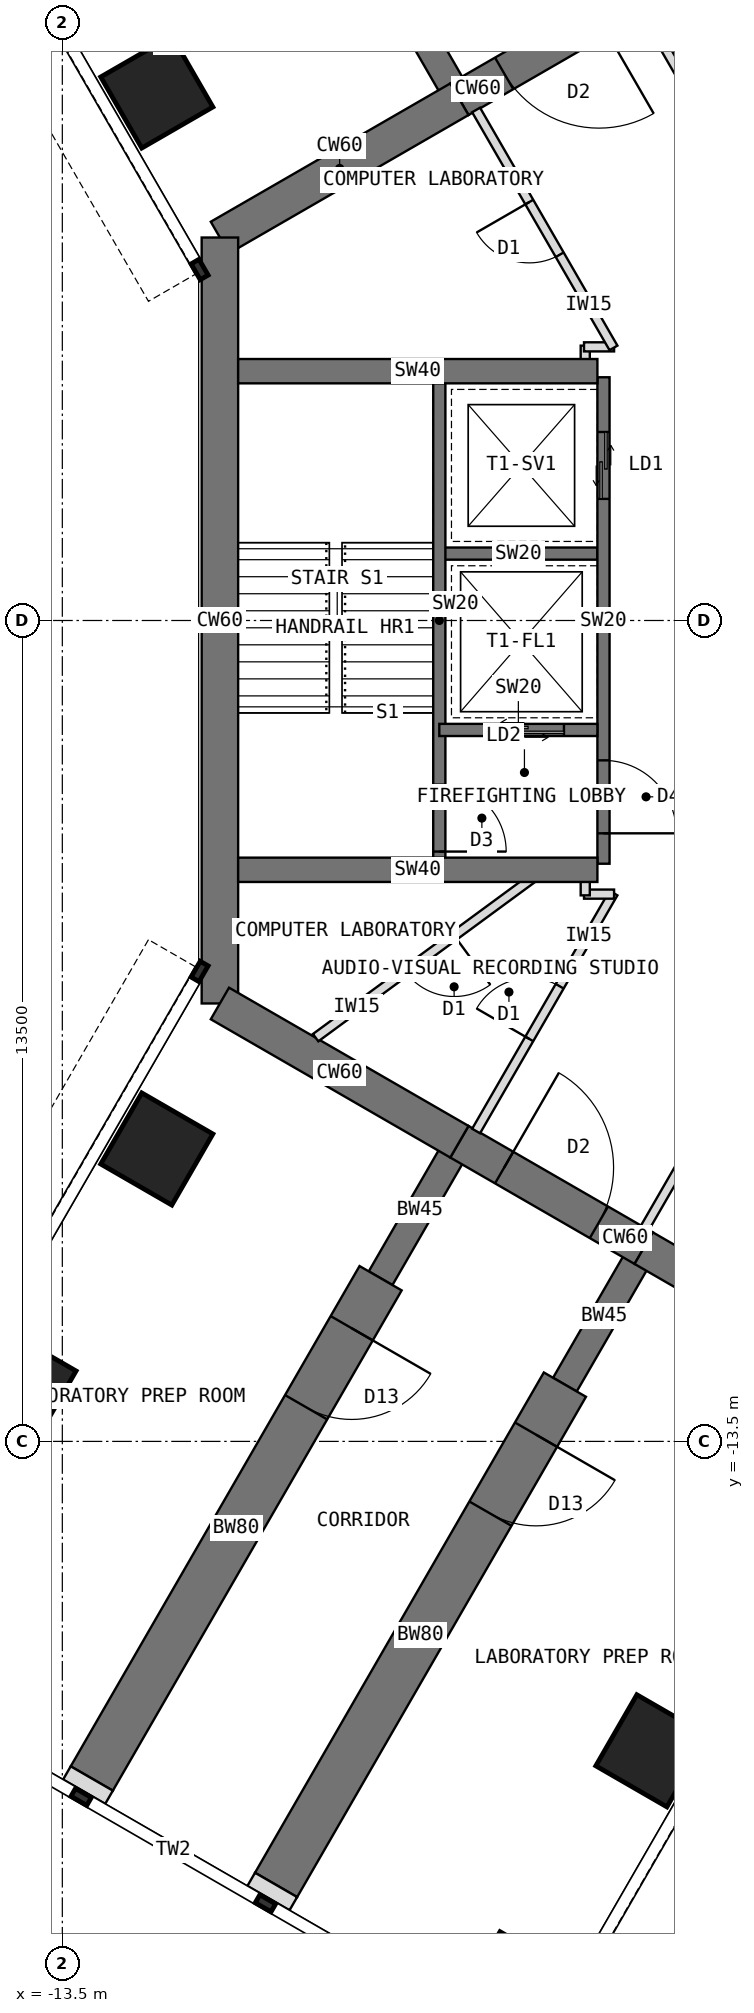
"""IFC4 building model, lengths in metres.
Left out: names, types, materials, properties, quantities, classifications, styles, units other than length and angle.
Written with IfcOpenShell. Run it as: python <this file> out.ifc"""

import sys

from ifc_helpers import new_model, si_unit, direction, frame, frame_2d, origin, origin_2d, place, context, subcontext, project, spatial, rectangle, extrude, element, fill, save


model = new_model("IFC4")
c1 = context("Model", 3, precision=1e-05, world=origin(), true_north=direction((0.0, 1.0)))
c2 = subcontext(c1, "Body", "Model", "MODEL_VIEW")
j1 = project(units=[si_unit("LENGTHUNIT", "METRE"), si_unit("PLANEANGLEUNIT", "RADIAN")], contexts=[c1])
p1 = place(None, origin())
s1 = spatial("IfcSite", under=j1, at=p1, CompositionType="ELEMENT")
p2 = place(p1, origin())
s2 = spatial("IfcBuilding", under=s1, at=p2, CompositionType="ELEMENT")
p3 = place(p2, frame((0.0, 0.0, 101.5)))
s3 = spatial("IfcBuildingStorey", under=s2, at=p3, CompositionType="ELEMENT", Elevation=101.5)
p4 = place(p3, frame((-3.939, 10.322, 0.0), z_axis=(0.0, 0.0, 1.0), x_axis=(-0.866019471182, -0.500010275428, 0.0)))
e1 = element("IfcWall", 1, at=p4, inside=s3, PredefinedType="SHEAR", context=c2, shape_type="SweptSolid", body=[
    extrude(rectangle(XDim=3.5, YDim=0.6, at=frame_2d((1.75, 0.0))), origin(), (0.0, 0.0, 1.0), 4.0),
])
p5 = place(p4, frame((0.85, 0.0, 0.0)))
e2 = element("IfcOpeningElement", 2, at=p5, cuts=e1, PredefinedType="OPENING", context=c2, shape_type="SweptSolid", body=[
    extrude(rectangle(XDim=1.8, YDim=2.1, at=frame_2d((0.9, 1.05))), frame((0.0, 0.31, 0.0), z_axis=(0.0, -1.0, 0.0), x_axis=(1.0, 0.0, 0.0)), (0.0, 0.0, 1.0), 0.62),
])
p6 = place(p3, frame((-6.97, 8.572, 0.0), z_axis=(0.0, 0.0, 1.0), x_axis=(-0.866034513004, -0.499984222037, 0.0)))
e3 = element("IfcWall", 3, at=p6, inside=s3, PredefinedType="SHEAR", context=c2, shape_type="SweptSolid", body=[
    extrude(rectangle(XDim=4.548, YDim=0.6, at=frame_2d((2.274, 0.0))), origin(), (0.0, 0.0, 1.0), 4.0),
])
p7 = place(p3, frame((-10.908, 6.298, 0.0), z_axis=(0.0, 0.0, 1.0), x_axis=(0.0, -1.0, 0.0)))
e4 = element("IfcWall", 4, at=p7, inside=s3, PredefinedType="SHEAR", context=c2, shape_type="SweptSolid", body=[
    extrude(rectangle(XDim=12.596, YDim=0.6, at=frame_2d((6.298, 0.0))), origin(), (0.0, 0.0, 1.0), 4.0),
])
p8 = place(p3, frame((-10.908, -6.298, 0.0), z_axis=(0.0, 0.0, 1.0), x_axis=(0.866034513004, -0.499984222037, 0.0)))
e5 = element("IfcWall", 5, at=p8, inside=s3, PredefinedType="SHEAR", context=c2, shape_type="SweptSolid", body=[
    extrude(rectangle(XDim=4.548, YDim=0.6, at=frame_2d((2.274, 0.0))), origin(), (0.0, 0.0, 1.0), 4.0),
])
p9 = place(p3, frame((-6.97, -8.572, 0.0), z_axis=(0.0, 0.0, 1.0), x_axis=(0.866019471182, -0.500010275428, 0.0)))
e6 = element("IfcWall", 6, at=p9, inside=s3, PredefinedType="SHEAR", context=c2, shape_type="SweptSolid", body=[
    extrude(rectangle(XDim=3.5, YDim=0.6, at=frame_2d((1.75, 0.0))), origin(), (0.0, 0.0, 1.0), 4.0),
])
p10 = place(p9, frame((0.85, 0.0, 0.0)))
e7 = element("IfcOpeningElement", 7, at=p10, cuts=e6, PredefinedType="OPENING", context=c2, shape_type="SweptSolid", body=[
    extrude(rectangle(XDim=1.8, YDim=2.1, at=frame_2d((0.9, 1.05))), frame((0.0, 0.31, 0.0), z_axis=(0.0, -1.0, 0.0), x_axis=(1.0, 0.0, 0.0)), (0.0, 0.0, 1.0), 0.62),
])
p11 = place(p3, frame((-3.939, -10.322, 0.0), z_axis=(0.0, 0.0, 1.0), x_axis=(0.866011268655, -0.500024481964, 0.0)))
e8 = element("IfcWall", 8, at=p11, inside=s3, PredefinedType="SHEAR", context=c2, shape_type="SweptSolid", body=[
    extrude(rectangle(XDim=4.548, YDim=0.6, at=frame_2d((2.274, 0.0))), origin(), (0.0, 0.0, 1.0), 4.0),
])
for number, where, z_axis, x_axis in (
    (9, (-6.97, 8.572, 0.0), (0.0, 0.0, 1.0), (-0.5, 0.866, 0.0)),
    (10, (-3.939, -10.322, 0.0), (0.0, 0.0, 1.0), (-0.5, -0.866, 0.0)),
):
    element("IfcWall", number, at=place(p3, frame(where, z_axis=z_axis, x_axis=x_axis)), inside=s3, PredefinedType="SHEAR", context=c2, shape_type="SweptSolid", body=[
        extrude(rectangle(XDim=2.592, YDim=0.45, at=frame_2d((1.296, 0.0))), origin(), (0.0, 0.0, 1.0), 4.0),
    ])
p12 = place(p3, frame((-5.234, -12.566, 0.0), z_axis=(0.0, 0.0, 1.0), x_axis=(-0.499997557548, -0.86602681393, 0.0)))
e11 = element("IfcWall", 11, at=p12, inside=s3, PredefinedType="SHEAR", context=c2, shape_type="SweptSolid", body=[
    extrude(rectangle(XDim=9.5, YDim=0.8, at=frame_2d((4.75, 0.0))), origin(), (0.0, 0.0, 1.0), 4.0),
])
p13 = place(p12, frame((0.95, 0.0, 0.0)))
e12 = element("IfcOpeningElement", 12, at=p13, cuts=e11, PredefinedType="OPENING", context=c2, shape_type="SweptSolid", body=[
    extrude(rectangle(XDim=1.5, YDim=2.1, at=frame_2d((0.75, 1.05))), frame((0.0, 0.41, 0.0), z_axis=(0.0, -1.0, 0.0), x_axis=(1.0, 0.0, 0.0)), (0.0, 0.0, 1.0), 0.82),
])
p14 = place(p3, frame((-6.97, -8.572, 0.0), z_axis=(0.0, 0.0, 1.0), x_axis=(-0.499988811324, -0.866031863473, 0.0)))
e13 = element("IfcWall", 13, at=p14, inside=s3, PredefinedType="SHEAR", context=c2, shape_type="SweptSolid", body=[
    extrude(rectangle(XDim=2.592, YDim=0.45, at=frame_2d((1.296, 0.0))), origin(), (0.0, 0.0, 1.0), 4.0),
])
p15 = place(p3, frame((-8.266, -10.816, 0.0), z_axis=(0.0, 0.0, 1.0), x_axis=(-0.499997557548, -0.86602681393, 0.0)))
e14 = element("IfcWall", 14, at=p15, inside=s3, PredefinedType="SHEAR", context=c2, shape_type="SweptSolid", body=[
    extrude(rectangle(XDim=9.5, YDim=0.8, at=frame_2d((4.75, 0.0))), origin(), (0.0, 0.0, 1.0), 4.0),
])
p16 = place(p15, frame((0.95, 0.0, 0.0)))
e15 = element("IfcOpeningElement", 15, at=p16, cuts=e14, PredefinedType="OPENING", context=c2, shape_type="SweptSolid", body=[
    extrude(rectangle(XDim=1.5, YDim=2.1, at=frame_2d((0.75, 1.05))), frame((0.0, 0.41, 0.0), z_axis=(0.0, -1.0, 0.0), x_axis=(1.0, 0.0, 0.0)), (0.0, 0.0, 1.0), 0.82),
])
for number, where, z_axis, x_axis in (
    (16, (-11.946, 8.691, 0.0), (0.0, 0.0, 1.0), (0.866, 0.5, 0.0)),
    (17, (-11.946, -8.691, 0.0), (0.0, 0.0, 1.0), (0.5, 0.866, 0.0)),
    (18, (-3.804, -18.588, 0.0), (0.0, 0.0, 1.0), (0.5, 0.866, 0.0)),
    (19, (-14.196, -12.588, 0.0), (0.0, 0.0, 1.0), (0.5, 0.866, 0.0)),
    (20, (-6.054, -22.486, 0.0), (0.0, 0.0, 1.0), (0.5, 0.866, 0.0)),
):
    element("IfcColumn", number, at=place(p3, frame(where, z_axis=z_axis, x_axis=x_axis)), inside=s3, PredefinedType="COLUMN", context=c2, shape_type="SweptSolid", body=[
        extrude(rectangle(XDim=1.35, YDim=1.35, at=origin_2d()), origin(), (0.0, 0.0, 1.0), 4.0),
    ])
for number, where, z_axis, x_axis in (
    (21, (-9.984, -20.794, 0.0), (0.0, 0.0, 1.0), (-0.5, -0.866, 0.0)),
    (22, (-13.016, -19.044, 0.0), (0.0, 0.0, 1.0), (-0.5, -0.866, 0.0)),
):
    element("IfcWall", number, at=place(p3, frame(where, z_axis=z_axis, x_axis=x_axis)), inside=s3, PredefinedType="PARTITIONING", context=c2, shape_type="SweptSolid", body=[
        extrude(rectangle(XDim=0.25, YDim=0.8, at=frame_2d((0.125, 0.0))), origin(), (0.0, 0.0, 1.0), 3.8),
    ])
p17 = place(p3, frame((-4.6, 4.0, 0.0), z_axis=(0.0, 0.0, 1.0), x_axis=(0.0, -1.0, 0.0)))
e23 = element("IfcWall", 23, at=p17, inside=s3, PredefinedType="SHEAR", context=c2, shape_type="SweptSolid", body=[
    extrude(rectangle(XDim=8.0, YDim=0.2, at=frame_2d((4.0, 0.0))), origin(), (0.0, 0.0, 1.0), 4.0),
])
p18 = place(p17, frame((6.3, 0.0, 0.0)))
e24 = element("IfcOpeningElement", 24, at=p18, cuts=e23, PredefinedType="OPENING", context=c2, shape_type="SweptSolid", body=[
    extrude(rectangle(XDim=1.2, YDim=2.1, at=frame_2d((0.6, 1.05))), frame((0.0, 0.11, 0.0), z_axis=(0.0, -1.0, 0.0), x_axis=(1.0, 0.0, 0.0)), (0.0, 0.0, 1.0), 0.22),
])
p19 = place(p17, frame((0.9, 0.0, 0.0)))
e25 = element("IfcOpeningElement", 25, at=p19, cuts=e23, PredefinedType="OPENING", context=c2, shape_type="SweptSolid", body=[
    extrude(rectangle(XDim=1.1, YDim=2.2, at=frame_2d((0.55, 1.1))), frame((0.0, 0.11, 0.0), z_axis=(0.0, -1.0, 0.0), x_axis=(1.0, 0.0, 0.0)), (0.0, 0.0, 1.0), 0.22),
])
p20 = place(p3, frame((-4.7, 1.1, 0.0), z_axis=(0.0, 0.0, 1.0), x_axis=(-1.0, 0.0, 0.0)))
e26 = element("IfcWall", 26, at=p20, inside=s3, PredefinedType="SHEAR", context=c2, shape_type="SweptSolid", body=[
    extrude(rectangle(XDim=2.6, YDim=0.2, at=frame_2d((1.3, 0.0))), origin(), (0.0, 0.0, 1.0), 4.0),
])
p21 = place(p3, frame((-4.7, -1.8, 0.0), z_axis=(0.0, 0.0, 1.0), x_axis=(-1.0, 0.0, 0.0)))
e27 = element("IfcWall", 27, at=p21, inside=s3, PredefinedType="SHEAR", context=c2, shape_type="SweptSolid", body=[
    extrude(rectangle(XDim=2.6, YDim=0.2, at=frame_2d((1.3, 0.0))), origin(), (0.0, 0.0, 1.0), 4.0),
])
p22 = place(p21, frame((0.55, 0.0, 0.0)))
e28 = element("IfcOpeningElement", 28, at=p22, cuts=e27, PredefinedType="OPENING", context=c2, shape_type="SweptSolid", body=[
    extrude(rectangle(XDim=1.3, YDim=2.2, at=frame_2d((0.65, 1.1))), frame((0.0, 0.11, 0.0), z_axis=(0.0, -1.0, 0.0), x_axis=(1.0, 0.0, 0.0)), (0.0, 0.0, 1.0), 0.22),
])
p23 = place(p3, frame((-7.3, 4.0, 0.0), z_axis=(0.0, 0.0, 1.0), x_axis=(0.0, -1.0, 0.0)))
e29 = element("IfcWall", 29, at=p23, inside=s3, PredefinedType="SHEAR", context=c2, shape_type="SweptSolid", body=[
    extrude(rectangle(XDim=8.0, YDim=0.2, at=frame_2d((4.0, 0.0))), origin(), (0.0, 0.0, 1.0), 4.0),
])
p24 = place(p23, frame((6.7, 0.0, 0.0)))
e30 = element("IfcOpeningElement", 30, at=p24, cuts=e29, PredefinedType="OPENING", context=c2, shape_type="SweptSolid", body=[
    extrude(rectangle(XDim=1.1, YDim=2.1, at=frame_2d((0.55, 1.05))), frame((0.0, 0.11, 0.0), z_axis=(0.0, -1.0, 0.0), x_axis=(1.0, 0.0, 0.0)), (0.0, 0.0, 1.0), 0.22),
])
for number, where, z_axis, x_axis in (
    (31, (-4.7, -4.1, 0.0), (0.0, 0.0, 1.0), (-1.0, 0.0, 0.0)),
    (32, (-4.7, 4.1, 0.0), (0.0, 0.0, 1.0), (-1.0, 0.0, 0.0)),
):
    element("IfcWall", number, at=place(p3, frame(where, z_axis=z_axis, x_axis=x_axis)), inside=s3, PredefinedType="SHEAR", context=c2, shape_type="SweptSolid", body=[
        extrude(rectangle(XDim=5.908, YDim=0.4, at=frame_2d((2.954, 0.0))), origin(), (0.0, 0.0, 1.0), 4.0),
    ])
p25 = place(p3, frame((-1.664, -6.083, 0.0), z_axis=(0.0, 0.0, 1.0), x_axis=(-0.500032713409, -0.866006515865, 0.0)))
e33 = element("IfcWall", 33, at=p25, inside=s3, PredefinedType="PARTITIONING", context=c2, shape_type="SweptSolid", body=[
    extrude(rectangle(XDim=4.518, YDim=0.15, at=frame_2d((2.259, 0.0))), origin(), (0.0, 0.0, 1.0), 3.8),
])
p26 = place(p25, frame((1.769, 0.0, 0.0)))
e34 = element("IfcOpeningElement", 34, at=p26, cuts=e33, PredefinedType="OPENING", context=c2, shape_type="SweptSolid", body=[
    extrude(rectangle(XDim=1.0, YDim=2.1, at=frame_2d((0.5, 1.05))), frame((0.0, 0.085, 0.0), z_axis=(0.0, -1.0, 0.0), x_axis=(1.0, 0.0, 0.0)), (0.0, 0.0, 1.0), 0.17),
])
p27 = place(p3, frame((-6.695, -8.396, 0.0), z_axis=(0.0, 0.0, 1.0), x_axis=(0.500009315796, 0.86602002524, 0.0)))
e35 = element("IfcWall", 35, at=p27, inside=s3, PredefinedType="PARTITIONING", context=c2, shape_type="SweptSolid", body=[
    extrude(rectangle(XDim=4.519, YDim=0.15, at=frame_2d((2.259, 0.0))), origin(), (0.0, 0.0, 1.0), 3.8),
])
p28 = place(p27, frame((1.749, 0.0, 0.0)))
e36 = element("IfcOpeningElement", 36, at=p28, cuts=e35, PredefinedType="OPENING", context=c2, shape_type="SweptSolid", body=[
    extrude(rectangle(XDim=1.0, YDim=2.1, at=frame_2d((0.5, 1.05))), frame((0.0, 0.085, 0.0), z_axis=(0.0, -1.0, 0.0), x_axis=(1.0, 0.0, 0.0)), (0.0, 0.0, 1.0), 0.17),
])
p29 = place(p3, frame((-4.426, -4.5, 0.0), z_axis=(0.0, 0.0, 1.0), x_axis=(-1.0, 0.0, 0.0)))
e37 = element("IfcWall", 37, at=p29, inside=s3, PredefinedType="PARTITIONING", context=c2, shape_type="SweptSolid", body=[
    extrude(rectangle(XDim=0.494, YDim=0.15, at=frame_2d((0.247, 0.0))), origin(), (0.0, 0.0, 1.0), 3.8),
])
for number, where, z_axis, x_axis in (
    (38, (-4.9, -4.52, 0.0), (0.0, 0.0, 1.0), (0.0, 1.0, 0.0)),
    (39, (-4.9, 4.09, 0.0), (0.0, 0.0, 1.0), (0.0, 1.0, 0.0)),
):
    element("IfcWall", number, at=place(p3, frame(where, z_axis=z_axis, x_axis=x_axis)), inside=s3, PredefinedType="PARTITIONING", context=c2, shape_type="SweptSolid", body=[
        extrude(rectangle(XDim=0.43, YDim=0.15, at=frame_2d((0.215, 0.0))), origin(), (0.0, 0.0, 1.0), 3.8),
    ])
p30 = place(p3, frame((-4.92, 4.5, 0.0), z_axis=(0.0, 0.0, 1.0), x_axis=(1.0, 0.0, 0.0)))
e40 = element("IfcWall", 40, at=p30, inside=s3, PredefinedType="PARTITIONING", context=c2, shape_type="SweptSolid", body=[
    extrude(rectangle(XDim=0.494, YDim=0.15, at=frame_2d((0.247, 0.0))), origin(), (0.0, 0.0, 1.0), 3.8),
])
p31 = place(p3, frame((-4.436, 4.483, 0.0), z_axis=(0.0, 0.0, 1.0), x_axis=(-0.500009315796, 0.86602002524, 0.0)))
e41 = element("IfcWall", 41, at=p31, inside=s3, PredefinedType="PARTITIONING", context=c2, shape_type="SweptSolid", body=[
    extrude(rectangle(XDim=4.519, YDim=0.15, at=frame_2d((2.259, 0.0))), origin(), (0.0, 0.0, 1.0), 3.8),
])
p32 = place(p31, frame((1.769, 0.0, 0.0)))
e42 = element("IfcOpeningElement", 42, at=p32, cuts=e41, PredefinedType="OPENING", context=c2, shape_type="SweptSolid", body=[
    extrude(rectangle(XDim=1.0, YDim=2.1, at=frame_2d((0.5, 1.05))), frame((0.0, 0.085, 0.0), z_axis=(0.0, -1.0, 0.0), x_axis=(1.0, 0.0, 0.0)), (0.0, 0.0, 1.0), 0.17),
])
p33 = place(p3, frame((-3.924, 9.996, 0.0), z_axis=(0.0, 0.0, 1.0), x_axis=(0.500032713409, -0.866006515865, 0.0)))
e43 = element("IfcWall", 43, at=p33, inside=s3, PredefinedType="PARTITIONING", context=c2, shape_type="SweptSolid", body=[
    extrude(rectangle(XDim=4.518, YDim=0.15, at=frame_2d((2.259, 0.0))), origin(), (0.0, 0.0, 1.0), 3.8),
])
p34 = place(p33, frame((1.749, 0.0, 0.0)))
e44 = element("IfcOpeningElement", 44, at=p34, cuts=e43, PredefinedType="OPENING", context=c2, shape_type="SweptSolid", body=[
    extrude(rectangle(XDim=1.0, YDim=2.1, at=frame_2d((0.5, 1.05))), frame((0.0, 0.085, 0.0), z_axis=(0.0, -1.0, 0.0), x_axis=(1.0, 0.0, 0.0)), (0.0, 0.0, 1.0), 0.17),
])
p35 = place(p3, frame((-5.578, -4.1, 0.0), z_axis=(0.0, 0.0, 1.0), x_axis=(-0.805776726519, -0.592219441593, 0.0)))
e45 = element("IfcWall", 45, at=p35, inside=s3, PredefinedType="PARTITIONING", context=c2, shape_type="SweptSolid", body=[
    extrude(rectangle(XDim=4.661, YDim=0.15, at=frame_2d((2.331, 0.0))), origin(), (0.0, 0.0, 1.0), 3.8),
])
p36 = place(p35, frame((1.831, 0.0, 0.0)))
e46 = element("IfcOpeningElement", 46, at=p36, cuts=e45, PredefinedType="OPENING", context=c2, shape_type="SweptSolid", body=[
    extrude(rectangle(XDim=1.0, YDim=2.1, at=frame_2d((0.5, 1.05))), frame((0.0, 0.085, 0.0), z_axis=(0.0, -1.0, 0.0), x_axis=(1.0, 0.0, 0.0)), (0.0, 0.0, 1.0), 0.17),
])
p37 = place(p18, origin())
e47 = element("IfcDoor", 47, at=p37, inside=s3, OperationType="SINGLE_SWING_RIGHT", PredefinedType="DOOR", context=c2, shape_type="SweptSolid", body=[
    extrude(rectangle(XDim=1.2, YDim=2.1, at=frame_2d((0.6, 1.05))), frame((0.0, 0.025, 0.0), z_axis=(0.0, -1.0, 0.0), x_axis=(1.0, 0.0, 0.0)), (0.0, 0.0, 1.0), 0.05),
])
fill(e24, e47)
p38 = place(p22, origin())
e48 = element("IfcDoor", 48, at=p38, inside=s3, OperationType="DOUBLE_DOOR_SLIDING", PredefinedType="DOOR", context=c2, shape_type="SweptSolid", body=[
    extrude(rectangle(XDim=1.3, YDim=2.2, at=frame_2d((0.65, 1.1))), frame((0.0, 0.025, 0.0), z_axis=(0.0, -1.0, 0.0), x_axis=(1.0, 0.0, 0.0)), (0.0, 0.0, 1.0), 0.05),
])
fill(e28, e48)
p39 = place(p19, origin())
e49 = element("IfcDoor", 49, at=p39, inside=s3, OperationType="DOUBLE_DOOR_SLIDING", PredefinedType="DOOR", context=c2, shape_type="SweptSolid", body=[
    extrude(rectangle(XDim=1.1, YDim=2.2, at=frame_2d((0.55, 1.1))), frame((0.0, 0.025, 0.0), z_axis=(0.0, -1.0, 0.0), x_axis=(1.0, 0.0, 0.0)), (0.0, 0.0, 1.0), 0.05),
])
fill(e25, e49)
p40 = place(p24, origin())
e50 = element("IfcDoor", 50, at=p40, inside=s3, OperationType="SINGLE_SWING_RIGHT", PredefinedType="DOOR", context=c2, shape_type="SweptSolid", body=[
    extrude(rectangle(XDim=1.1, YDim=2.1, at=frame_2d((0.55, 1.05))), frame((0.0, 0.025, 0.0), z_axis=(0.0, -1.0, 0.0), x_axis=(1.0, 0.0, 0.0)), (0.0, 0.0, 1.0), 0.05),
])
fill(e30, e50)
p41 = place(p5, origin())
e51 = element("IfcDoor", 51, at=p41, inside=s3, OperationType="DOUBLE_DOOR_DOUBLE_SWING", PredefinedType="DOOR", context=c2, shape_type="SweptSolid", body=[
    extrude(rectangle(XDim=1.72, YDim=2.06, at=frame_2d((0.9, 1.03))), frame((0.0, 0.025, 0.0), z_axis=(0.0, -1.0, 0.0), x_axis=(1.0, 0.0, 0.0)), (0.0, 0.0, 1.0), 0.05),
    extrude(rectangle(XDim=0.04, YDim=2.1, at=frame_2d((0.02, 1.05))), frame((0.0, 0.3, 0.0), z_axis=(0.0, -1.0, 0.0), x_axis=(1.0, 0.0, 0.0)), (0.0, 0.0, 1.0), 0.6),
    extrude(rectangle(XDim=0.04, YDim=2.1, at=frame_2d((1.78, 1.05))), frame((0.0, 0.3, 0.0), z_axis=(0.0, -1.0, 0.0), x_axis=(1.0, 0.0, 0.0)), (0.0, 0.0, 1.0), 0.6),
    extrude(rectangle(XDim=1.72, YDim=0.04, at=frame_2d((0.9, 2.08))), frame((0.0, 0.3, 0.0), z_axis=(0.0, -1.0, 0.0), x_axis=(1.0, 0.0, 0.0)), (0.0, 0.0, 1.0), 0.6),
])
fill(e2, e51)
p42 = place(p10, origin())
e52 = element("IfcDoor", 52, at=p42, inside=s3, OperationType="DOUBLE_DOOR_DOUBLE_SWING", PredefinedType="DOOR", context=c2, shape_type="SweptSolid", body=[
    extrude(rectangle(XDim=1.72, YDim=2.06, at=frame_2d((0.9, 1.03))), frame((0.0, 0.025, 0.0), z_axis=(0.0, -1.0, 0.0), x_axis=(1.0, 0.0, 0.0)), (0.0, 0.0, 1.0), 0.05),
    extrude(rectangle(XDim=0.04, YDim=2.1, at=frame_2d((0.02, 1.05))), frame((0.0, 0.3, 0.0), z_axis=(0.0, -1.0, 0.0), x_axis=(1.0, 0.0, 0.0)), (0.0, 0.0, 1.0), 0.6),
    extrude(rectangle(XDim=0.04, YDim=2.1, at=frame_2d((1.78, 1.05))), frame((0.0, 0.3, 0.0), z_axis=(0.0, -1.0, 0.0), x_axis=(1.0, 0.0, 0.0)), (0.0, 0.0, 1.0), 0.6),
    extrude(rectangle(XDim=1.72, YDim=0.04, at=frame_2d((0.9, 2.08))), frame((0.0, 0.3, 0.0), z_axis=(0.0, -1.0, 0.0), x_axis=(1.0, 0.0, 0.0)), (0.0, 0.0, 1.0), 0.6),
])
fill(e7, e52)
p43 = place(p36, origin())
e53 = element("IfcDoor", 53, at=p43, inside=s3, OperationType="SINGLE_SWING_LEFT", PredefinedType="DOOR", context=c2, shape_type="SweptSolid", body=[
    extrude(rectangle(XDim=1.0, YDim=2.1, at=frame_2d((0.5, 1.05))), frame((0.0, 0.025, 0.0), z_axis=(0.0, -1.0, 0.0), x_axis=(1.0, 0.0, 0.0)), (0.0, 0.0, 1.0), 0.05),
])
fill(e46, e53)
p44 = place(p28, origin())
e54 = element("IfcDoor", 54, at=p44, inside=s3, OperationType="SINGLE_SWING_LEFT", PredefinedType="DOOR", context=c2, shape_type="SweptSolid", body=[
    extrude(rectangle(XDim=1.0, YDim=2.1, at=frame_2d((0.5, 1.05))), frame((0.0, 0.025, 0.0), z_axis=(0.0, -1.0, 0.0), x_axis=(1.0, 0.0, 0.0)), (0.0, 0.0, 1.0), 0.05),
])
fill(e36, e54)
p45 = place(p32, origin())
e55 = element("IfcDoor", 55, at=p45, inside=s3, OperationType="SINGLE_SWING_RIGHT", PredefinedType="DOOR", context=c2, shape_type="SweptSolid", body=[
    extrude(rectangle(XDim=1.0, YDim=2.1, at=frame_2d((0.5, 1.05))), frame((0.0, 0.025, 0.0), z_axis=(0.0, -1.0, 0.0), x_axis=(1.0, 0.0, 0.0)), (0.0, 0.0, 1.0), 0.05),
])
fill(e42, e55)
p46 = place(p13, origin())
e56 = element("IfcDoor", 56, at=p46, inside=s3, OperationType="DOUBLE_DOOR_SINGLE_SWING", PredefinedType="DOOR", context=c2, shape_type="SweptSolid", body=[
    extrude(rectangle(XDim=1.42, YDim=2.06, at=frame_2d((0.75, 1.03))), frame((0.0, 0.025, 0.0), z_axis=(0.0, -1.0, 0.0), x_axis=(1.0, 0.0, 0.0)), (0.0, 0.0, 1.0), 0.05),
    extrude(rectangle(XDim=0.04, YDim=2.1, at=frame_2d((0.02, 1.05))), frame((0.0, 0.4, 0.0), z_axis=(0.0, -1.0, 0.0), x_axis=(1.0, 0.0, 0.0)), (0.0, 0.0, 1.0), 0.8),
    extrude(rectangle(XDim=0.04, YDim=2.1, at=frame_2d((1.48, 1.05))), frame((0.0, 0.4, 0.0), z_axis=(0.0, -1.0, 0.0), x_axis=(1.0, 0.0, 0.0)), (0.0, 0.0, 1.0), 0.8),
    extrude(rectangle(XDim=1.42, YDim=0.04, at=frame_2d((0.75, 2.08))), frame((0.0, 0.4, 0.0), z_axis=(0.0, -1.0, 0.0), x_axis=(1.0, 0.0, 0.0)), (0.0, 0.0, 1.0), 0.8),
])
fill(e12, e56)
p47 = place(p16, origin())
e57 = element("IfcDoor", 57, at=p47, inside=s3, OperationType="DOUBLE_DOOR_SINGLE_SWING", PredefinedType="DOOR", context=c2, shape_type="SweptSolid", body=[
    extrude(rectangle(XDim=1.42, YDim=2.06, at=frame_2d((0.75, 1.03))), frame((0.0, 0.025, 0.0), z_axis=(0.0, -1.0, 0.0), x_axis=(1.0, 0.0, 0.0)), (0.0, 0.0, 1.0), 0.05),
    extrude(rectangle(XDim=0.04, YDim=2.1, at=frame_2d((0.02, 1.05))), frame((0.0, 0.4, 0.0), z_axis=(0.0, -1.0, 0.0), x_axis=(1.0, 0.0, 0.0)), (0.0, 0.0, 1.0), 0.8),
    extrude(rectangle(XDim=0.04, YDim=2.1, at=frame_2d((1.48, 1.05))), frame((0.0, 0.4, 0.0), z_axis=(0.0, -1.0, 0.0), x_axis=(1.0, 0.0, 0.0)), (0.0, 0.0, 1.0), 0.8),
    extrude(rectangle(XDim=1.42, YDim=0.04, at=frame_2d((0.75, 2.08))), frame((0.0, 0.4, 0.0), z_axis=(0.0, -1.0, 0.0), x_axis=(1.0, 0.0, 0.0)), (0.0, 0.0, 1.0), 0.8),
])
fill(e15, e57)
save(model, sys.argv[1])
